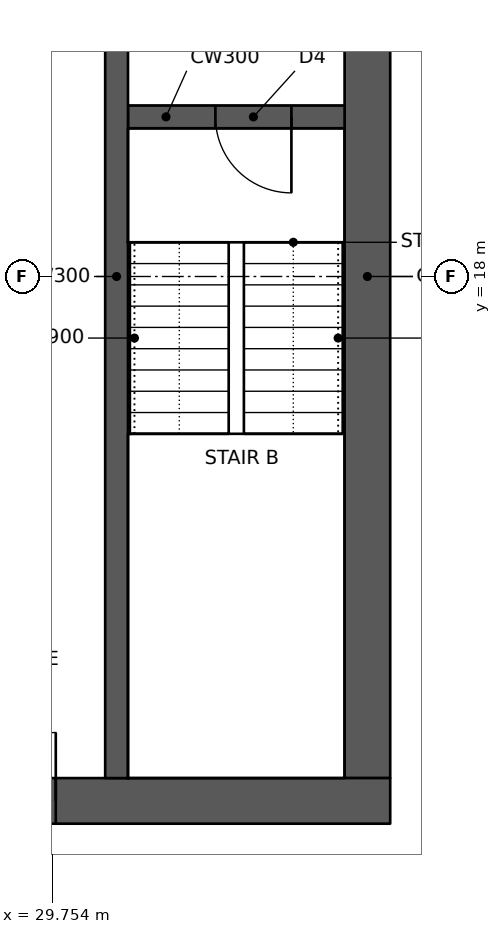
"""IFC4 building model, lengths in metres.
Left out: names, types, materials, properties, quantities, classifications, styles, units other than length and angle.
Written with IfcOpenShell. Run it as: python <this file> out.ifc"""

import sys

from ifc_helpers import new_model, si_unit, direction, frame, frame_2d, origin, place, context, subcontext, project, spatial, rectangle, extrude, element, fill, save


model = new_model("IFC4")
c1 = context("Model", 3, precision=1e-05, world=origin(), true_north=direction((0.0, 1.0)))
c2 = subcontext(c1, "Body", "Model", "MODEL_VIEW")
j1 = project(units=[si_unit("LENGTHUNIT", "METRE"), si_unit("PLANEANGLEUNIT", "RADIAN")], contexts=[c1])
p1 = place(None, origin())
s1 = spatial("IfcSite", under=j1, at=p1, CompositionType="ELEMENT")
p2 = place(p1, origin())
s2 = spatial("IfcBuilding", under=s1, at=p2, CompositionType="ELEMENT")
p3 = place(p2, frame((0.0, 0.0, 167.2)))
s3 = spatial("IfcBuildingStorey", under=s2, at=p3, CompositionType="ELEMENT", Elevation=167.2)
p4 = place(p3, frame((10.8, 11.1, 0.0), z_axis=(0.0, 0.0, 1.0), x_axis=(1.0, 0.0, 0.0)))
e1 = element("IfcWall", 1, at=p4, inside=s3, PredefinedType="SHEAR", context=c2, shape_type="SweptSolid", body=[
    extrude(rectangle(XDim=23.4, YDim=0.6, at=frame_2d((11.7, 0.0))), origin(), (0.0, 0.0, 1.0), 3.4),
])
p5 = place(p4, frame((1.0, 0.0, 0.0)))
e2 = element("IfcOpeningElement", 2, at=p5, cuts=e1, PredefinedType="OPENING", context=c2, shape_type="SweptSolid", body=[
    extrude(rectangle(XDim=1.0, YDim=2.1, at=frame_2d((0.5, 1.05))), frame((0.0, 0.31, 0.0), z_axis=(0.0, -1.0, 0.0), x_axis=(1.0, 0.0, 0.0)), (0.0, 0.0, 1.0), 0.62),
])
p6 = place(p4, frame((17.2, 0.0, 0.0)))
e3 = element("IfcOpeningElement", 3, at=p6, cuts=e1, PredefinedType="OPENING", context=c2, shape_type="SweptSolid", body=[
    extrude(rectangle(XDim=1.8, YDim=2.1, at=frame_2d((0.9, 1.05))), frame((0.0, 0.31, 0.0), z_axis=(0.0, -1.0, 0.0), x_axis=(1.0, 0.0, 0.0)), (0.0, 0.0, 1.0), 0.62),
])
p7 = place(p3, frame((33.9, 11.4, 0.0), z_axis=(0.0, 0.0, 1.0), x_axis=(0.0, 1.0, 0.0)))
e4 = element("IfcWall", 4, at=p7, inside=s3, PredefinedType="SHEAR", context=c2, shape_type="SweptSolid", body=[
    extrude(rectangle(XDim=13.2, YDim=0.6, at=frame_2d((6.6, 0.0))), origin(), (0.0, 0.0, 1.0), 3.4),
])
p8 = place(p3, frame((30.6, 11.4, 0.0), z_axis=(0.0, 0.0, 1.0), x_axis=(0.0, 1.0, 0.0)))
e5 = element("IfcWall", 5, at=p8, inside=s3, PredefinedType="SHEAR", context=c2, shape_type="SweptSolid", body=[
    extrude(rectangle(XDim=13.2, YDim=0.3, at=frame_2d((6.6, 0.0))), origin(), (0.0, 0.0, 1.0), 3.4),
])
p9 = place(p3, frame((30.75, 20.1, 0.0), z_axis=(0.0, 0.0, 1.0), x_axis=(1.0, 0.0, 0.0)))
e6 = element("IfcWall", 6, at=p9, inside=s3, PredefinedType="SHEAR", context=c2, shape_type="SweptSolid", body=[
    extrude(rectangle(XDim=2.85, YDim=0.3, at=frame_2d((1.425, 0.0))), origin(), (0.0, 0.0, 1.0), 3.4),
])
p10 = place(p9, frame((1.15, 0.0, 0.0)))
e7 = element("IfcOpeningElement", 7, at=p10, cuts=e6, PredefinedType="OPENING", context=c2, shape_type="SweptSolid", body=[
    extrude(rectangle(XDim=1.0, YDim=2.1, at=frame_2d((0.5, 1.05))), frame((0.0, 0.16, 0.0), z_axis=(0.0, -1.0, 0.0), x_axis=(1.0, 0.0, 0.0)), (0.0, 0.0, 1.0), 0.32),
])
p11 = place(p6, origin())
e8 = element("IfcDoor", 8, at=p11, inside=s3, OperationType="DOUBLE_DOOR_SINGLE_SWING", PredefinedType="DOOR", context=c2, shape_type="SweptSolid", body=[
    extrude(rectangle(XDim=1.8, YDim=2.1, at=frame_2d((0.9, 1.05))), frame((0.0, 0.025, 0.0), z_axis=(0.0, -1.0, 0.0), x_axis=(1.0, 0.0, 0.0)), (0.0, 0.0, 1.0), 0.05),
])
fill(e3, e8)
p12 = place(p10, frame((1.0, 0.0, 0.0), z_axis=(0.0, 0.0, 1.0), x_axis=(-1.0, 0.0, 0.0)))
e9 = element("IfcDoor", 9, at=p12, inside=s3, OperationType="SINGLE_SWING_LEFT", PredefinedType="DOOR", context=c2, shape_type="SweptSolid", body=[
    extrude(rectangle(XDim=1.0, YDim=2.1, at=frame_2d((0.5, 1.05))), frame((0.0, 0.025, 0.0), z_axis=(0.0, -1.0, 0.0), x_axis=(1.0, 0.0, 0.0)), (0.0, 0.0, 1.0), 0.05),
])
fill(e7, e9)
save(model, sys.argv[1])
